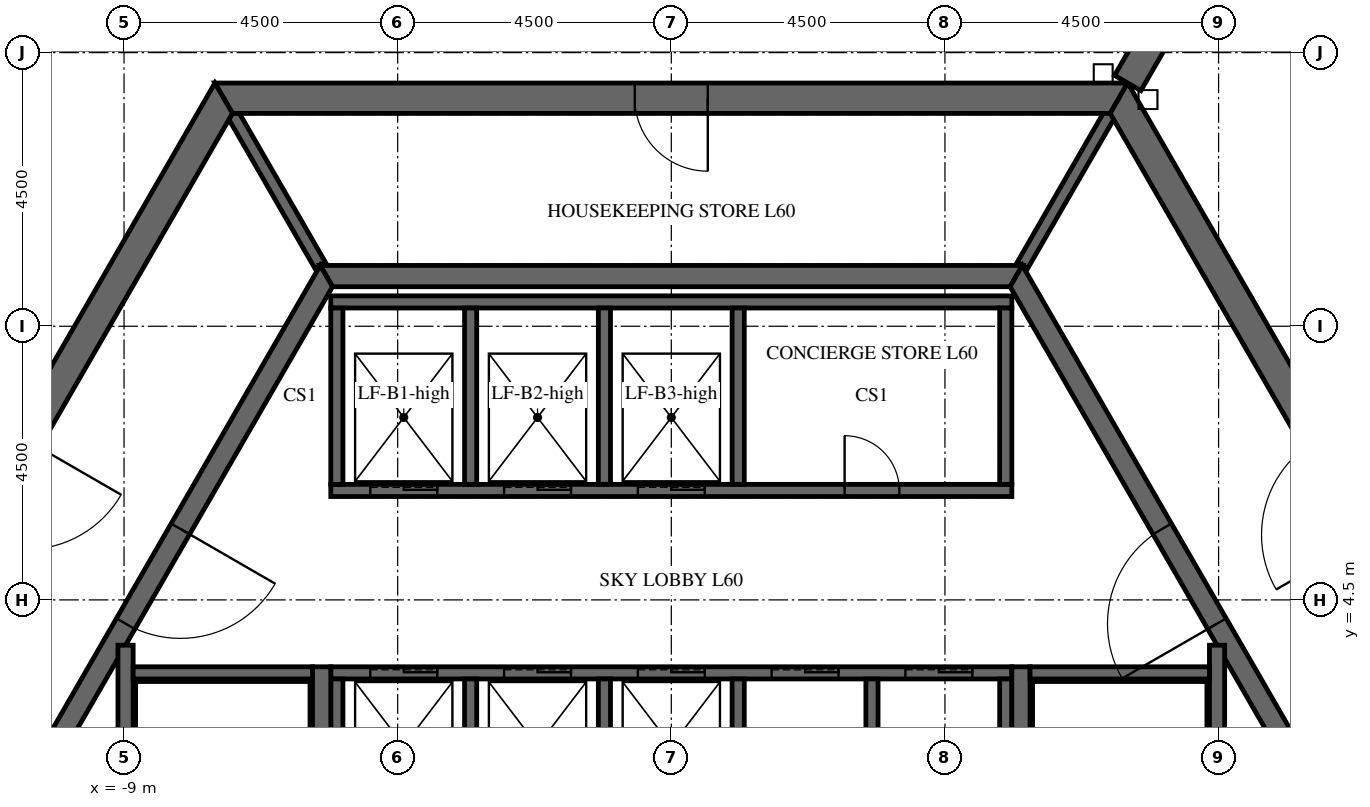
"""IFC4 building model, lengths in metres.
Left out: names, types, materials, properties, quantities, classifications, styles, units other than length and angle.
Written with IfcOpenShell. Run it as: python <this file> out.ifc"""

import sys

from ifc_helpers import new_model, si_unit, direction, frame, frame_2d, origin, place, context, subcontext, project, spatial, polyline, rectangle, outline, extrude, element, fill, save


model = new_model("IFC4")
c1 = context("Model", 3, precision=1e-05, world=origin(), true_north=direction((0.0, 1.0)))
c2 = subcontext(c1, "Body", "Model", "MODEL_VIEW")
j1 = project(units=[si_unit("LENGTHUNIT", "METRE"), si_unit("PLANEANGLEUNIT", "RADIAN")], contexts=[c1])
p1 = place(None, origin())
s1 = spatial("IfcSite", under=j1, at=p1, CompositionType="ELEMENT")
p2 = place(p1, origin())
s2 = spatial("IfcBuilding", under=s1, at=p2, CompositionType="ELEMENT")
p3 = place(p2, frame((0.0, 0.0, 250.2)))
s3 = spatial("IfcBuildingStorey", under=s2, at=p3, CompositionType="ELEMENT", Elevation=250.2)
p4 = place(p3, frame((-7.361, 12.75, -0.3), z_axis=(0.0, 0.0, 1.0), x_axis=(-0.50000571537, -0.866022103989, 0.0)))
e1 = element("IfcWall", 1, at=p4, inside=s3, PredefinedType="SHEAR", context=c2, shape_type="SweptSolid", body=[
    extrude(outline(polyline([(-0.144, -0.25), (14.867, -0.25), (14.578, 0.25), (0.144, 0.25), (-0.144, -0.25)])), origin(), (0.0, 0.0, 1.0), 5.8),
])
p5 = place(p4, frame((6.49, 0.0, 0.3)))
e2 = element("IfcOpeningElement", 2, at=p5, cuts=e1, PredefinedType="OPENING", context=c2, shape_type="SweptSolid", body=[
    extrude(rectangle(XDim=1.8, YDim=2.4, at=frame_2d((0.9, 1.2))), frame((0.0, 0.26, 0.0), z_axis=(0.0, -1.0, 0.0), x_axis=(1.0, 0.0, 0.0)), (0.0, 0.0, 1.0), 0.52),
])
p6 = place(p3, frame((14.722, 0.0, -0.3), z_axis=(0.0, 0.0, 1.0), x_axis=(-0.50000571537, 0.866022103989, 0.0)))
e3 = element("IfcWall", 3, at=p6, inside=s3, PredefinedType="SHEAR", context=c2, shape_type="SweptSolid", body=[
    extrude(outline(polyline([(-0.144, -0.25), (14.867, -0.25), (14.578, 0.25), (0.144, 0.25), (-0.144, -0.25)])), origin(), (0.0, 0.0, 1.0), 5.8),
])
p7 = place(p6, frame((6.432, 0.0, 0.3)))
e4 = element("IfcOpeningElement", 4, at=p7, cuts=e3, PredefinedType="OPENING", context=c2, shape_type="SweptSolid", body=[
    extrude(rectangle(XDim=1.8, YDim=2.4, at=frame_2d((0.9, 1.2))), frame((0.0, 0.26, 0.0), z_axis=(0.0, -1.0, 0.0), x_axis=(1.0, 0.0, 0.0)), (0.0, 0.0, 1.0), 0.52),
])
p8 = place(p3, frame((7.361, 12.75, -0.3), z_axis=(0.0, 0.0, 1.0), x_axis=(-1.0, 0.0, 0.0)))
e5 = element("IfcWall", 5, at=p8, inside=s3, PredefinedType="SHEAR", context=c2, shape_type="SweptSolid", body=[
    extrude(outline(polyline([(-0.144, -0.25), (14.866, -0.25), (14.578, 0.25), (0.144, 0.25), (-0.144, -0.25)])), origin(), (0.0, 0.0, 1.0), 5.8),
])
p9 = place(p8, frame((6.761, 0.0, 0.3)))
e6 = element("IfcOpeningElement", 6, at=p9, cuts=e5, PredefinedType="OPENING", context=c2, shape_type="SweptSolid", body=[
    extrude(rectangle(XDim=1.2, YDim=2.4, at=frame_2d((0.6, 1.2))), frame((0.0, 0.26, 0.0), z_axis=(0.0, -1.0, 0.0), x_axis=(1.0, 0.0, 0.0)), (0.0, 0.0, 1.0), 0.52),
])
p10 = place(p3, frame((7.506, 13.0, -0.3), z_axis=(0.0, 0.0, 1.0), x_axis=(0.499988271576, 0.866032175087, 0.0)))
e7 = element("IfcWall", 7, at=p10, inside=s3, PredefinedType="SHEAR", context=c2, shape_type="SweptSolid", body=[
    extrude(rectangle(XDim=15.424, YDim=0.5, at=frame_2d((7.712, 0.0))), origin(), (0.0, 0.0, 1.0), 5.8),
])
p11 = place(p10, frame((6.812, 0.0, 0.3)))
e8 = element("IfcOpeningElement", 8, at=p11, cuts=e7, PredefinedType="OPENING", context=c2, shape_type="SweptSolid", body=[
    extrude(rectangle(XDim=1.8, YDim=2.4, at=frame_2d((0.9, 1.2))), frame((0.0, 0.26, 0.0), z_axis=(0.0, -1.0, 0.0), x_axis=(1.0, 0.0, 0.0)), (0.0, 0.0, 1.0), 0.52),
])
p12 = place(p3, frame((-5.673, 9.825, -0.3), z_axis=(0.0, 0.0, 1.0), x_axis=(-0.499995046907, -0.866028263435, 0.0)))
e9 = element("IfcWall", 9, at=p12, inside=s3, PredefinedType="SHEAR", context=c2, shape_type="SweptSolid", body=[
    extrude(outline(polyline([(-0.101, -0.175), (11.446, -0.175), (11.244, 0.175), (0.101, 0.175), (-0.101, -0.175)])), origin(), (0.0, 0.0, 1.0), 5.8),
])
p13 = place(p12, frame((4.801, 0.0, 0.3)))
e10 = element("IfcOpeningElement", 10, at=p13, cuts=e9, PredefinedType="OPENING", context=c2, shape_type="SweptSolid", body=[
    extrude(rectangle(XDim=1.8, YDim=2.4, at=frame_2d((0.9, 1.2))), frame((0.0, 0.185, 0.0), z_axis=(0.0, -1.0, 0.0), x_axis=(1.0, 0.0, 0.0)), (0.0, 0.0, 1.0), 0.37),
])
p14 = place(p3, frame((11.345, 0.0, -0.3), z_axis=(0.0, 0.0, 1.0), x_axis=(-0.499995046907, 0.866028263435, 0.0)))
e11 = element("IfcWall", 11, at=p14, inside=s3, PredefinedType="SHEAR", context=c2, shape_type="SweptSolid", body=[
    extrude(outline(polyline([(-0.101, -0.175), (11.446, -0.175), (11.244, 0.175), (0.101, 0.175), (-0.101, -0.175)])), origin(), (0.0, 0.0, 1.0), 5.8),
])
p15 = place(p14, frame((4.744, 0.0, 0.3)))
e12 = element("IfcOpeningElement", 12, at=p15, cuts=e11, PredefinedType="OPENING", context=c2, shape_type="SweptSolid", body=[
    extrude(rectangle(XDim=1.8, YDim=2.4, at=frame_2d((0.9, 1.2))), frame((0.0, 0.185, 0.0), z_axis=(0.0, -1.0, 0.0), x_axis=(1.0, 0.0, 0.0)), (0.0, 0.0, 1.0), 0.37),
])
p16 = place(p3, frame((5.673, 9.825, -0.3), z_axis=(0.0, 0.0, 1.0), x_axis=(-1.0, 0.0, 0.0)))
e13 = element("IfcWall", 13, at=p16, inside=s3, PredefinedType="SHEAR", context=c2, shape_type="SweptSolid", body=[
    extrude(outline(polyline([(-0.101, -0.175), (11.446, -0.175), (11.244, 0.175), (0.101, 0.175), (-0.101, -0.175)])), origin(), (0.0, 0.0, 1.0), 5.8),
])
p17 = place(p3, frame((-5.6, 6.3, -0.25), z_axis=(0.0, 0.0, 1.0), x_axis=(1.0, 0.0, 0.0)))
e14 = element("IfcWall", 14, at=p17, inside=s3, PredefinedType="SHEAR", context=c2, shape_type="SweptSolid", body=[
    extrude(rectangle(XDim=11.2, YDim=0.2, at=frame_2d((5.6, 0.0))), origin(), (0.0, 0.0, 1.0), 5.75),
])
p18 = place(p17, frame((8.45, 0.0, 0.25)))
e15 = element("IfcOpeningElement", 15, at=p18, cuts=e14, PredefinedType="OPENING", context=c2, shape_type="SweptSolid", body=[
    extrude(rectangle(XDim=0.9, YDim=2.1, at=frame_2d((0.45, 1.05))), frame((0.0, 0.11, 0.0), z_axis=(0.0, -1.0, 0.0), x_axis=(1.0, 0.0, 0.0)), (0.0, 0.0, 1.0), 0.22),
])
p19 = place(p17, frame((0.65, 0.0, 0.25)))
e16 = element("IfcOpeningElement", 16, at=p19, cuts=e14, PredefinedType="OPENING", context=c2, shape_type="SweptSolid", body=[
    extrude(rectangle(XDim=1.1, YDim=2.1, at=frame_2d((0.55, 1.05))), frame((0.0, 0.11, 0.0), z_axis=(0.0, -1.0, 0.0), x_axis=(1.0, 0.0, 0.0)), (0.0, 0.0, 1.0), 0.22),
])
p20 = place(p17, frame((2.85, 0.0, 0.25)))
e17 = element("IfcOpeningElement", 17, at=p20, cuts=e14, PredefinedType="OPENING", context=c2, shape_type="SweptSolid", body=[
    extrude(rectangle(XDim=1.1, YDim=2.1, at=frame_2d((0.55, 1.05))), frame((0.0, 0.11, 0.0), z_axis=(0.0, -1.0, 0.0), x_axis=(1.0, 0.0, 0.0)), (0.0, 0.0, 1.0), 0.22),
])
p21 = place(p17, frame((5.05, 0.0, 0.25)))
e18 = element("IfcOpeningElement", 18, at=p21, cuts=e14, PredefinedType="OPENING", context=c2, shape_type="SweptSolid", body=[
    extrude(rectangle(XDim=1.1, YDim=2.1, at=frame_2d((0.55, 1.05))), frame((0.0, 0.11, 0.0), z_axis=(0.0, -1.0, 0.0), x_axis=(1.0, 0.0, 0.0)), (0.0, 0.0, 1.0), 0.22),
])
p22 = place(p3, frame((-5.6, 9.4, -0.25), z_axis=(0.0, 0.0, 1.0), x_axis=(1.0, 0.0, 0.0)))
e19 = element("IfcWall", 19, at=p22, inside=s3, PredefinedType="SHEAR", context=c2, shape_type="SweptSolid", body=[
    extrude(rectangle(XDim=11.2, YDim=0.2, at=frame_2d((5.6, 0.0))), origin(), (0.0, 0.0, 1.0), 5.75),
])
for number, where, z_axis, x_axis in (
    (20, (-5.5, 6.4, -0.25), (0.0, 0.0, 1.0), (0.0, 1.0, 0.0)),
    (21, (-3.3, 6.4, -0.25), (0.0, 0.0, 1.0), (0.0, 1.0, 0.0)),
    (22, (-1.1, 6.4, -0.25), (0.0, 0.0, 1.0), (0.0, 1.0, 0.0)),
    (23, (1.1, 6.4, -0.25), (0.0, 0.0, 1.0), (0.0, 1.0, 0.0)),
    (24, (5.5, 6.4, -0.25), (0.0, 0.0, 1.0), (0.0, 1.0, 0.0)),
):
    element("IfcWall", number, at=place(p3, frame(where, z_axis=z_axis, x_axis=x_axis)), inside=s3, PredefinedType="SHEAR", context=c2, shape_type="SweptSolid", body=[
        extrude(rectangle(XDim=2.9, YDim=0.2, at=frame_2d((1.45, 0.0))), origin(), (0.0, 0.0, 1.0), 5.75),
    ])
p23 = place(p3, frame((-5.6, 3.3, -0.25), z_axis=(0.0, 0.0, 1.0), x_axis=(1.0, 0.0, 0.0)))
e25 = element("IfcWall", 25, at=p23, inside=s3, PredefinedType="SHEAR", context=c2, shape_type="SweptSolid", body=[
    extrude(rectangle(XDim=11.2, YDim=0.2, at=frame_2d((5.6, 0.0))), origin(), (0.0, 0.0, 1.0), 5.75),
])
p24 = place(p23, frame((0.65, 0.0, 0.25)))
e26 = element("IfcOpeningElement", 26, at=p24, cuts=e25, PredefinedType="OPENING", context=c2, shape_type="SweptSolid", body=[
    extrude(rectangle(XDim=1.1, YDim=2.1, at=frame_2d((0.55, 1.05))), frame((0.0, 0.11, 0.0), z_axis=(0.0, -1.0, 0.0), x_axis=(1.0, 0.0, 0.0)), (0.0, 0.0, 1.0), 0.22),
])
p25 = place(p23, frame((2.85, 0.0, 0.25)))
e27 = element("IfcOpeningElement", 27, at=p25, cuts=e25, PredefinedType="OPENING", context=c2, shape_type="SweptSolid", body=[
    extrude(rectangle(XDim=1.1, YDim=2.1, at=frame_2d((0.55, 1.05))), frame((0.0, 0.11, 0.0), z_axis=(0.0, -1.0, 0.0), x_axis=(1.0, 0.0, 0.0)), (0.0, 0.0, 1.0), 0.22),
])
p26 = place(p23, frame((5.05, 0.0, 0.25)))
e28 = element("IfcOpeningElement", 28, at=p26, cuts=e25, PredefinedType="OPENING", context=c2, shape_type="SweptSolid", body=[
    extrude(rectangle(XDim=1.1, YDim=2.1, at=frame_2d((0.55, 1.05))), frame((0.0, 0.11, 0.0), z_axis=(0.0, -1.0, 0.0), x_axis=(1.0, 0.0, 0.0)), (0.0, 0.0, 1.0), 0.22),
])
p27 = place(p23, frame((7.25, 0.0, 0.25)))
e29 = element("IfcOpeningElement", 29, at=p27, cuts=e25, PredefinedType="OPENING", context=c2, shape_type="SweptSolid", body=[
    extrude(rectangle(XDim=1.1, YDim=2.1, at=frame_2d((0.55, 1.05))), frame((0.0, 0.11, 0.0), z_axis=(0.0, -1.0, 0.0), x_axis=(1.0, 0.0, 0.0)), (0.0, 0.0, 1.0), 0.22),
])
p28 = place(p23, frame((9.45, 0.0, 0.25)))
e30 = element("IfcOpeningElement", 30, at=p28, cuts=e25, PredefinedType="OPENING", context=c2, shape_type="SweptSolid", body=[
    extrude(rectangle(XDim=1.1, YDim=2.1, at=frame_2d((0.55, 1.05))), frame((0.0, 0.11, 0.0), z_axis=(0.0, -1.0, 0.0), x_axis=(1.0, 0.0, 0.0)), (0.0, 0.0, 1.0), 0.22),
])
for number, where, z_axis, x_axis in (
    (31, (-5.5, 0.1, -0.25), (0.0, 0.0, 1.0), (0.0, 1.0, 0.0)),
    (32, (-3.3, 0.1, -0.25), (0.0, 0.0, 1.0), (0.0, 1.0, 0.0)),
    (33, (-1.1, 0.1, -0.25), (0.0, 0.0, 1.0), (0.0, 1.0, 0.0)),
    (34, (1.1, 0.1, -0.25), (0.0, 0.0, 1.0), (0.0, 1.0, 0.0)),
    (35, (3.3, 0.1, -0.25), (0.0, 0.0, 1.0), (0.0, 1.0, 0.0)),
    (36, (5.5, 0.1, -0.25), (0.0, 0.0, 1.0), (0.0, 1.0, 0.0)),
):
    element("IfcWall", number, at=place(p3, frame(where, z_axis=z_axis, x_axis=x_axis)), inside=s3, PredefinedType="SHEAR", context=c2, shape_type="SweptSolid", body=[
        extrude(rectangle(XDim=3.1, YDim=0.2, at=frame_2d((1.55, 0.0))), origin(), (0.0, 0.0, 1.0), 5.75),
    ])
for number, where, z_axis, x_axis in (
    (37, (5.773, 10.0, -0.3), (0.0, 0.0, 1.0), (0.5, 0.866, 0.0)),
    (38, (-5.773, 10.0, -0.3), (0.0, 0.0, 1.0), (-0.5, 0.866, 0.0)),
):
    element("IfcWall", number, at=place(p3, frame(where, z_axis=z_axis, x_axis=x_axis)), inside=s3, PredefinedType="SHEAR", context=c2, shape_type="SweptSolid", body=[
        extrude(rectangle(XDim=2.887, YDim=0.2, at=frame_2d((1.443, 0.0))), origin(), (0.0, 0.0, 1.0), 5.8),
    ])
p29 = place(p3, frame((5.75, -3.4, -0.25), z_axis=(0.0, 0.0, 1.0), x_axis=(0.0, 1.0, 0.0)))
e39 = element("IfcWall", 39, at=p29, inside=s3, PredefinedType="SHEAR", context=c2, shape_type="SweptSolid", body=[
    extrude(rectangle(XDim=6.8, YDim=0.3, at=frame_2d((3.4, 0.0))), origin(), (0.0, 0.0, 1.0), 5.75),
])
p30 = place(p3, frame((8.975, -3.755, -0.25), z_axis=(0.0, 0.0, 1.0), x_axis=(0.0, 1.0, 0.0)))
e40 = element("IfcWall", 40, at=p30, inside=s3, PredefinedType="SHEAR", context=c2, shape_type="SweptSolid", body=[
    extrude(rectangle(XDim=7.51, YDim=0.25, at=frame_2d((3.755, 0.0))), origin(), (0.0, 0.0, 1.0), 5.75),
])
p31 = place(p3, frame((5.9, 3.3, -0.25), z_axis=(0.0, 0.0, 1.0), x_axis=(1.0, 0.0, 0.0)))
e41 = element("IfcWall", 41, at=p31, inside=s3, PredefinedType="SHEAR", context=c2, shape_type="SweptSolid", body=[
    extrude(rectangle(XDim=2.95, YDim=0.2, at=frame_2d((1.475, 0.0))), origin(), (0.0, 0.0, 1.0), 5.75),
])
p32 = place(p3, frame((-5.75, -3.4, -0.25), z_axis=(0.0, 0.0, 1.0), x_axis=(0.0, 1.0, 0.0)))
e42 = element("IfcWall", 42, at=p32, inside=s3, PredefinedType="SHEAR", context=c2, shape_type="SweptSolid", body=[
    extrude(rectangle(XDim=6.8, YDim=0.3, at=frame_2d((3.4, 0.0))), origin(), (0.0, 0.0, 1.0), 5.75),
])
p33 = place(p3, frame((-8.975, -3.755, -0.25), z_axis=(0.0, 0.0, 1.0), x_axis=(0.0, 1.0, 0.0)))
e43 = element("IfcWall", 43, at=p33, inside=s3, PredefinedType="SHEAR", context=c2, shape_type="SweptSolid", body=[
    extrude(rectangle(XDim=7.51, YDim=0.25, at=frame_2d((3.755, 0.0))), origin(), (0.0, 0.0, 1.0), 5.75),
])
p34 = place(p3, frame((-8.85, 3.3, -0.25), z_axis=(0.0, 0.0, 1.0), x_axis=(1.0, 0.0, 0.0)))
e44 = element("IfcWall", 44, at=p34, inside=s3, PredefinedType="SHEAR", context=c2, shape_type="SweptSolid", body=[
    extrude(rectangle(XDim=2.95, YDim=0.2, at=frame_2d((1.475, 0.0))), origin(), (0.0, 0.0, 1.0), 5.75),
])
p35 = place(p3, frame((-10.174, 15.177, 0.0), z_axis=(0.0, 0.0, 1.0), x_axis=(-0.500018949701, -0.866014462893, 0.0)))
e45 = element("IfcWall", 45, at=p35, inside=s3, PredefinedType="PARTITIONING", context=c2, shape_type="SweptSolid", body=[
    extrude(rectangle(XDim=14.469, YDim=0.15, at=frame_2d((7.235, 0.0))), origin(), (0.0, 0.0, 1.0), 5.5),
])
p36 = place(p3, frame((15.414, 6.103, 0.0), z_axis=(0.0, 0.0, 1.0), x_axis=(-0.50002969912, 0.86600825631, 0.0)))
e46 = element("IfcWall", 46, at=p36, inside=s3, PredefinedType="PARTITIONING", context=c2, shape_type="SweptSolid", body=[
    extrude(rectangle(XDim=11.601, YDim=0.2, at=frame_2d((5.801, 0.0))), origin(), (0.0, 0.0, 1.0), 5.5),
])
p37 = place(p9, origin())
e47 = element("IfcDoor", 47, at=p37, inside=s3, OperationType="SINGLE_SWING_LEFT", PredefinedType="DOOR", context=c2, shape_type="SweptSolid", body=[
    extrude(rectangle(XDim=1.2, YDim=2.4, at=frame_2d((0.6, 1.2))), frame((0.0, 0.025, 0.0), z_axis=(0.0, -1.0, 0.0), x_axis=(1.0, 0.0, 0.0)), (0.0, 0.0, 1.0), 0.05),
])
fill(e6, e47)
p38 = place(p13, origin())
e48 = element("IfcDoor", 48, at=p38, inside=s3, OperationType="DOUBLE_DOOR_SINGLE_SWING", PredefinedType="DOOR", context=c2, shape_type="SweptSolid", body=[
    extrude(rectangle(XDim=1.8, YDim=2.4, at=frame_2d((0.9, 1.2))), frame((0.0, 0.025, 0.0), z_axis=(0.0, -1.0, 0.0), x_axis=(1.0, 0.0, 0.0)), (0.0, 0.0, 1.0), 0.05),
])
fill(e10, e48)
p39 = place(p15, origin())
e49 = element("IfcDoor", 49, at=p39, inside=s3, OperationType="DOUBLE_DOOR_SINGLE_SWING", PredefinedType="DOOR", context=c2, shape_type="SweptSolid", body=[
    extrude(rectangle(XDim=1.8, YDim=2.4, at=frame_2d((0.9, 1.2))), frame((0.0, 0.025, 0.0), z_axis=(0.0, -1.0, 0.0), x_axis=(1.0, 0.0, 0.0)), (0.0, 0.0, 1.0), 0.05),
])
fill(e12, e49)
p40 = place(p18, origin())
e50 = element("IfcDoor", 50, at=p40, inside=s3, OperationType="SINGLE_SWING_LEFT", PredefinedType="DOOR", context=c2, shape_type="SweptSolid", body=[
    extrude(rectangle(XDim=0.9, YDim=2.1, at=frame_2d((0.45, 1.05))), frame((0.0, 0.025, 0.0), z_axis=(0.0, -1.0, 0.0), x_axis=(1.0, 0.0, 0.0)), (0.0, 0.0, 1.0), 0.05),
])
fill(e15, e50)
p41 = place(p19, origin())
e51 = element("IfcDoor", 51, at=p41, inside=s3, OperationType="SLIDING_TO_LEFT", PredefinedType="DOOR", context=c2, shape_type="SweptSolid", body=[
    extrude(rectangle(XDim=1.1, YDim=2.1, at=frame_2d((0.55, 1.05))), frame((0.0, 0.025, 0.0), z_axis=(0.0, -1.0, 0.0), x_axis=(1.0, 0.0, 0.0)), (0.0, 0.0, 1.0), 0.05),
])
fill(e16, e51)
p42 = place(p20, origin())
e52 = element("IfcDoor", 52, at=p42, inside=s3, OperationType="SLIDING_TO_LEFT", PredefinedType="DOOR", context=c2, shape_type="SweptSolid", body=[
    extrude(rectangle(XDim=1.1, YDim=2.1, at=frame_2d((0.55, 1.05))), frame((0.0, 0.025, 0.0), z_axis=(0.0, -1.0, 0.0), x_axis=(1.0, 0.0, 0.0)), (0.0, 0.0, 1.0), 0.05),
])
fill(e17, e52)
p43 = place(p21, origin())
e53 = element("IfcDoor", 53, at=p43, inside=s3, OperationType="SLIDING_TO_LEFT", PredefinedType="DOOR", context=c2, shape_type="SweptSolid", body=[
    extrude(rectangle(XDim=1.1, YDim=2.1, at=frame_2d((0.55, 1.05))), frame((0.0, 0.025, 0.0), z_axis=(0.0, -1.0, 0.0), x_axis=(1.0, 0.0, 0.0)), (0.0, 0.0, 1.0), 0.05),
])
fill(e18, e53)
p44 = place(p24, origin())
e54 = element("IfcDoor", 54, at=p44, inside=s3, OperationType="SLIDING_TO_LEFT", PredefinedType="DOOR", context=c2, shape_type="SweptSolid", body=[
    extrude(rectangle(XDim=1.1, YDim=2.1, at=frame_2d((0.55, 1.05))), frame((0.0, 0.025, 0.0), z_axis=(0.0, -1.0, 0.0), x_axis=(1.0, 0.0, 0.0)), (0.0, 0.0, 1.0), 0.05),
])
fill(e26, e54)
p45 = place(p25, origin())
e55 = element("IfcDoor", 55, at=p45, inside=s3, OperationType="SLIDING_TO_LEFT", PredefinedType="DOOR", context=c2, shape_type="SweptSolid", body=[
    extrude(rectangle(XDim=1.1, YDim=2.1, at=frame_2d((0.55, 1.05))), frame((0.0, 0.025, 0.0), z_axis=(0.0, -1.0, 0.0), x_axis=(1.0, 0.0, 0.0)), (0.0, 0.0, 1.0), 0.05),
])
fill(e27, e55)
p46 = place(p26, origin())
e56 = element("IfcDoor", 56, at=p46, inside=s3, OperationType="SLIDING_TO_LEFT", PredefinedType="DOOR", context=c2, shape_type="SweptSolid", body=[
    extrude(rectangle(XDim=1.1, YDim=2.1, at=frame_2d((0.55, 1.05))), frame((0.0, 0.025, 0.0), z_axis=(0.0, -1.0, 0.0), x_axis=(1.0, 0.0, 0.0)), (0.0, 0.0, 1.0), 0.05),
])
fill(e28, e56)
p47 = place(p27, origin())
e57 = element("IfcDoor", 57, at=p47, inside=s3, OperationType="SLIDING_TO_LEFT", PredefinedType="DOOR", context=c2, shape_type="SweptSolid", body=[
    extrude(rectangle(XDim=1.1, YDim=2.1, at=frame_2d((0.55, 1.05))), frame((0.0, 0.025, 0.0), z_axis=(0.0, -1.0, 0.0), x_axis=(1.0, 0.0, 0.0)), (0.0, 0.0, 1.0), 0.05),
])
fill(e29, e57)
p48 = place(p28, origin())
e58 = element("IfcDoor", 58, at=p48, inside=s3, OperationType="SLIDING_TO_LEFT", PredefinedType="DOOR", context=c2, shape_type="SweptSolid", body=[
    extrude(rectangle(XDim=1.1, YDim=2.1, at=frame_2d((0.55, 1.05))), frame((0.0, 0.025, 0.0), z_axis=(0.0, -1.0, 0.0), x_axis=(1.0, 0.0, 0.0)), (0.0, 0.0, 1.0), 0.05),
])
fill(e30, e58)
save(model, sys.argv[1])
